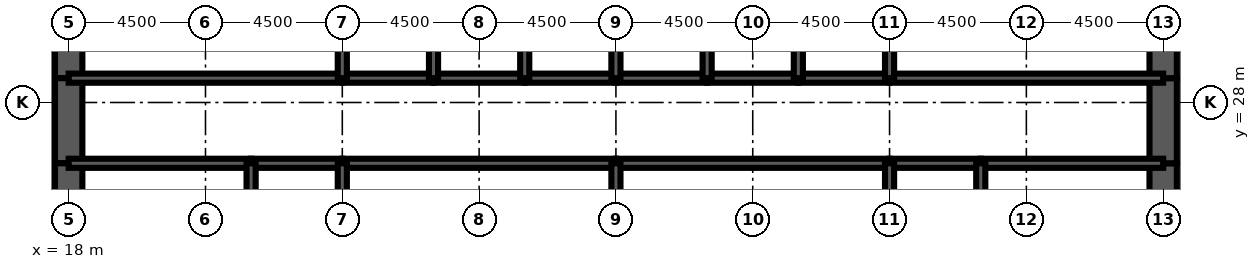
"""IFC4 building model, lengths in metres.
Left out: names, types, materials, properties, quantities, classifications, styles, units other than length and angle.
Written with IfcOpenShell. Run it as: python <this file> out.ifc"""

import sys

from ifc_helpers import new_model, si_unit, direction, frame, frame_2d, origin, place, context, subcontext, project, spatial, rectangle, extrude, element, fill, save


model = new_model("IFC4")
c1 = context("Model", 3, precision=1e-05, world=origin(), true_north=direction((0.0, 1.0)))
c2 = subcontext(c1, "Body", "Model", "MODEL_VIEW")
j1 = project(units=[si_unit("LENGTHUNIT", "METRE"), si_unit("PLANEANGLEUNIT", "RADIAN")], contexts=[c1])
p1 = place(None, origin())
s1 = spatial("IfcSite", under=j1, at=p1, CompositionType="ELEMENT")
p2 = place(p1, origin())
s2 = spatial("IfcBuilding", under=s1, at=p2, CompositionType="ELEMENT")
p3 = place(p2, frame((0.0, 0.0, 100.5)))
s3 = spatial("IfcBuildingStorey", under=s2, at=p3, CompositionType="ELEMENT", Elevation=100.5)
p4 = place(p3, frame((18.0, 32.0, 0.0), z_axis=(0.0, 0.0, 1.0), x_axis=(0.0, -1.0, 0.0)))
e1 = element("IfcWall", 1, at=p4, inside=s3, PredefinedType="SHEAR", context=c2, shape_type="SweptSolid", body=[
    extrude(rectangle(XDim=3.2, YDim=0.9, at=frame_2d((1.6, 0.0))), origin(), (0.0, 0.0, 1.0), 4.2),
])
p5 = place(p3, frame((18.0, 28.8, 0.0), z_axis=(0.0, 0.0, 1.0), x_axis=(0.0, -1.0, 0.0)))
e2 = element("IfcWall", 2, at=p5, inside=s3, PredefinedType="SHEAR", context=c2, shape_type="SweptSolid", body=[
    extrude(rectangle(XDim=2.8, YDim=0.9, at=frame_2d((1.4, 0.0))), origin(), (0.0, 0.0, 1.0), 4.2),
])
p6 = place(p5, frame((0.4, 0.0, 0.0)))
e3 = element("IfcOpeningElement", 3, at=p6, cuts=e2, PredefinedType="OPENING", context=c2, shape_type="SweptSolid", body=[
    extrude(rectangle(XDim=1.8, YDim=2.1, at=frame_2d((0.9, 1.05))), frame((0.0, 0.46, 0.0), z_axis=(0.0, -1.0, 0.0), x_axis=(1.0, 0.0, 0.0)), (0.0, 0.0, 1.0), 0.92),
])
for number, where, z_axis, x_axis in (
    (4, (18.0, 26.0, 0.0), (0.0, 0.0, 1.0), (0.0, -1.0, 0.0)),
    (5, (54.0, 22.0, 0.0), (0.0, 0.0, 1.0), (0.0, 1.0, 0.0)),
):
    element("IfcWall", number, at=place(p3, frame(where, z_axis=z_axis, x_axis=x_axis)), inside=s3, PredefinedType="SHEAR", context=c2, shape_type="SweptSolid", body=[
        extrude(rectangle(XDim=4.0, YDim=0.9, at=frame_2d((2.0, 0.0))), origin(), (0.0, 0.0, 1.0), 4.2),
    ])
p7 = place(p3, frame((54.0, 26.0, 0.0), z_axis=(0.0, 0.0, 1.0), x_axis=(0.0, 1.0, 0.0)))
e6 = element("IfcWall", 6, at=p7, inside=s3, PredefinedType="SHEAR", context=c2, shape_type="SweptSolid", body=[
    extrude(rectangle(XDim=2.8, YDim=0.9, at=frame_2d((1.4, 0.0))), origin(), (0.0, 0.0, 1.0), 4.2),
])
p8 = place(p7, frame((0.6, 0.0, 0.0)))
e7 = element("IfcOpeningElement", 7, at=p8, cuts=e6, PredefinedType="OPENING", context=c2, shape_type="SweptSolid", body=[
    extrude(rectangle(XDim=1.8, YDim=2.1, at=frame_2d((0.9, 1.05))), frame((0.0, 0.46, 0.0), z_axis=(0.0, -1.0, 0.0), x_axis=(1.0, 0.0, 0.0)), (0.0, 0.0, 1.0), 0.92),
])
p9 = place(p3, frame((54.0, 28.8, 0.0), z_axis=(0.0, 0.0, 1.0), x_axis=(0.0, 1.0, 0.0)))
e8 = element("IfcWall", 8, at=p9, inside=s3, PredefinedType="SHEAR", context=c2, shape_type="SweptSolid", body=[
    extrude(rectangle(XDim=3.2, YDim=0.9, at=frame_2d((1.6, 0.0))), origin(), (0.0, 0.0, 1.0), 4.2),
])
p10 = place(p3, frame((18.0, 28.8, 0.0), z_axis=(0.0, 0.0, 1.0), x_axis=(1.0, 0.0, 0.0)))
e9 = element("IfcWall", 9, at=p10, inside=s3, PredefinedType="SOLIDWALL", context=c2, shape_type="SweptSolid", body=[
    extrude(rectangle(XDim=9.0, YDim=0.3, at=frame_2d((4.5, 0.0))), origin(), (0.0, 0.0, 1.0), 4.2),
])
p11 = place(p10, frame((0.65, 0.0, 0.0)))
e10 = element("IfcOpeningElement", 10, at=p11, cuts=e9, PredefinedType="OPENING", context=c2, shape_type="SweptSolid", body=[
    extrude(rectangle(XDim=1.0, YDim=2.1, at=frame_2d((0.5, 1.05))), frame((0.0, 0.16, 0.0), z_axis=(0.0, -1.0, 0.0), x_axis=(1.0, 0.0, 0.0)), (0.0, 0.0, 1.0), 0.32),
])
p12 = place(p3, frame((27.0, 28.8, 0.0), z_axis=(0.0, 0.0, 1.0), x_axis=(1.0, 0.0, 0.0)))
e11 = element("IfcWall", 11, at=p12, inside=s3, PredefinedType="SOLIDWALL", context=c2, shape_type="SweptSolid", body=[
    extrude(rectangle(XDim=3.0, YDim=0.3, at=frame_2d((1.5, 0.0))), origin(), (0.0, 0.0, 1.0), 4.2),
])
p13 = place(p12, frame((0.95, 0.0, 0.0)))
e12 = element("IfcOpeningElement", 12, at=p13, cuts=e11, PredefinedType="OPENING", context=c2, shape_type="SweptSolid", body=[
    extrude(rectangle(XDim=1.1, YDim=2.2, at=frame_2d((0.55, 1.1))), frame((0.0, 0.16, 0.0), z_axis=(0.0, -1.0, 0.0), x_axis=(1.0, 0.0, 0.0)), (0.0, 0.0, 1.0), 0.32),
])
p14 = place(p3, frame((30.0, 28.8, 0.0), z_axis=(0.0, 0.0, 1.0), x_axis=(1.0, 0.0, 0.0)))
e13 = element("IfcWall", 13, at=p14, inside=s3, PredefinedType="SOLIDWALL", context=c2, shape_type="SweptSolid", body=[
    extrude(rectangle(XDim=3.0, YDim=0.3, at=frame_2d((1.5, 0.0))), origin(), (0.0, 0.0, 1.0), 4.2),
])
p15 = place(p14, frame((0.95, 0.0, 0.0)))
e14 = element("IfcOpeningElement", 14, at=p15, cuts=e13, PredefinedType="OPENING", context=c2, shape_type="SweptSolid", body=[
    extrude(rectangle(XDim=1.1, YDim=2.2, at=frame_2d((0.55, 1.1))), frame((0.0, 0.16, 0.0), z_axis=(0.0, -1.0, 0.0), x_axis=(1.0, 0.0, 0.0)), (0.0, 0.0, 1.0), 0.32),
])
p16 = place(p3, frame((33.0, 28.8, 0.0), z_axis=(0.0, 0.0, 1.0), x_axis=(1.0, 0.0, 0.0)))
e15 = element("IfcWall", 15, at=p16, inside=s3, PredefinedType="SOLIDWALL", context=c2, shape_type="SweptSolid", body=[
    extrude(rectangle(XDim=3.0, YDim=0.3, at=frame_2d((1.5, 0.0))), origin(), (0.0, 0.0, 1.0), 4.2),
])
p17 = place(p16, frame((0.95, 0.0, 0.0)))
e16 = element("IfcOpeningElement", 16, at=p17, cuts=e15, PredefinedType="OPENING", context=c2, shape_type="SweptSolid", body=[
    extrude(rectangle(XDim=1.1, YDim=2.2, at=frame_2d((0.55, 1.1))), frame((0.0, 0.16, 0.0), z_axis=(0.0, -1.0, 0.0), x_axis=(1.0, 0.0, 0.0)), (0.0, 0.0, 1.0), 0.32),
])
for number, where, z_axis, x_axis in (
    (17, (36.0, 28.8, 0.0), (0.0, 0.0, 1.0), (1.0, 0.0, 0.0)),
    (18, (39.0, 28.8, 0.0), (0.0, 0.0, 1.0), (1.0, 0.0, 0.0)),
):
    element("IfcWall", number, at=place(p3, frame(where, z_axis=z_axis, x_axis=x_axis)), inside=s3, PredefinedType="SOLIDWALL", context=c2, shape_type="SweptSolid", body=[
        extrude(rectangle(XDim=3.0, YDim=0.3, at=frame_2d((1.5, 0.0))), origin(), (0.0, 0.0, 1.0), 4.2),
    ])
p18 = place(p3, frame((42.0, 28.8, 0.0), z_axis=(0.0, 0.0, 1.0), x_axis=(1.0, 0.0, 0.0)))
e19 = element("IfcWall", 19, at=p18, inside=s3, PredefinedType="SOLIDWALL", context=c2, shape_type="SweptSolid", body=[
    extrude(rectangle(XDim=3.0, YDim=0.3, at=frame_2d((1.5, 0.0))), origin(), (0.0, 0.0, 1.0), 4.2),
])
p19 = place(p18, frame((0.95, 0.0, 0.0)))
e20 = element("IfcOpeningElement", 20, at=p19, cuts=e19, PredefinedType="OPENING", context=c2, shape_type="SweptSolid", body=[
    extrude(rectangle(XDim=1.1, YDim=2.2, at=frame_2d((0.55, 1.1))), frame((0.0, 0.16, 0.0), z_axis=(0.0, -1.0, 0.0), x_axis=(1.0, 0.0, 0.0)), (0.0, 0.0, 1.0), 0.32),
])
p20 = place(p3, frame((45.0, 28.8, 0.0), z_axis=(0.0, 0.0, 1.0), x_axis=(1.0, 0.0, 0.0)))
e21 = element("IfcWall", 21, at=p20, inside=s3, PredefinedType="SOLIDWALL", context=c2, shape_type="SweptSolid", body=[
    extrude(rectangle(XDim=9.0, YDim=0.3, at=frame_2d((4.5, 0.0))), origin(), (0.0, 0.0, 1.0), 4.2),
])
p21 = place(p20, frame((7.35, 0.0, 0.0)))
e22 = element("IfcOpeningElement", 22, at=p21, cuts=e21, PredefinedType="OPENING", context=c2, shape_type="SweptSolid", body=[
    extrude(rectangle(XDim=1.0, YDim=2.1, at=frame_2d((0.5, 1.05))), frame((0.0, 0.16, 0.0), z_axis=(0.0, -1.0, 0.0), x_axis=(1.0, 0.0, 0.0)), (0.0, 0.0, 1.0), 0.32),
])
p22 = place(p3, frame((18.0, 26.0, 0.0), z_axis=(0.0, 0.0, 1.0), x_axis=(1.0, 0.0, 0.0)))
e23 = element("IfcWall", 23, at=p22, inside=s3, PredefinedType="SOLIDWALL", context=c2, shape_type="SweptSolid", body=[
    extrude(rectangle(XDim=6.0, YDim=0.3, at=frame_2d((3.0, 0.0))), origin(), (0.0, 0.0, 1.0), 4.2),
])
p23 = place(p3, frame((24.0, 26.0, 0.0), z_axis=(0.0, 0.0, 1.0), x_axis=(1.0, 0.0, 0.0)))
e24 = element("IfcWall", 24, at=p23, inside=s3, PredefinedType="SOLIDWALL", context=c2, shape_type="SweptSolid", body=[
    extrude(rectangle(XDim=3.0, YDim=0.3, at=frame_2d((1.5, 0.0))), origin(), (0.0, 0.0, 1.0), 4.2),
])
for number, where, z_axis, x_axis in (
    (25, (27.0, 26.0, 0.0), (0.0, 0.0, 1.0), (1.0, 0.0, 0.0)),
    (26, (36.0, 26.0, 0.0), (0.0, 0.0, 1.0), (1.0, 0.0, 0.0)),
):
    element("IfcWall", number, at=place(p3, frame(where, z_axis=z_axis, x_axis=x_axis)), inside=s3, PredefinedType="SOLIDWALL", context=c2, shape_type="SweptSolid", body=[
        extrude(rectangle(XDim=9.0, YDim=0.3, at=frame_2d((4.5, 0.0))), origin(), (0.0, 0.0, 1.0), 4.2),
    ])
p24 = place(p3, frame((45.0, 26.0, 0.0), z_axis=(0.0, 0.0, 1.0), x_axis=(1.0, 0.0, 0.0)))
e27 = element("IfcWall", 27, at=p24, inside=s3, PredefinedType="SOLIDWALL", context=c2, shape_type="SweptSolid", body=[
    extrude(rectangle(XDim=3.0, YDim=0.3, at=frame_2d((1.5, 0.0))), origin(), (0.0, 0.0, 1.0), 4.2),
])
p25 = place(p3, frame((48.0, 26.0, 0.0), z_axis=(0.0, 0.0, 1.0), x_axis=(1.0, 0.0, 0.0)))
e28 = element("IfcWall", 28, at=p25, inside=s3, PredefinedType="SOLIDWALL", context=c2, shape_type="SweptSolid", body=[
    extrude(rectangle(XDim=6.0, YDim=0.3, at=frame_2d((3.0, 0.0))), origin(), (0.0, 0.0, 1.0), 4.2),
])
for number, where, z_axis, x_axis in (
    (29, (27.0, 28.8, 0.0), (0.0, 0.0, 1.0), (0.0, 1.0, 0.0)),
    (30, (30.0, 28.8, 0.0), (0.0, 0.0, 1.0), (0.0, 1.0, 0.0)),
    (31, (33.0, 28.8, 0.0), (0.0, 0.0, 1.0), (0.0, 1.0, 0.0)),
    (32, (36.0, 28.8, 0.0), (0.0, 0.0, 1.0), (0.0, 1.0, 0.0)),
    (33, (39.0, 28.8, 0.0), (0.0, 0.0, 1.0), (0.0, 1.0, 0.0)),
    (34, (42.0, 28.8, 0.0), (0.0, 0.0, 1.0), (0.0, 1.0, 0.0)),
    (35, (45.0, 28.8, 0.0), (0.0, 0.0, 1.0), (0.0, 1.0, 0.0)),
):
    element("IfcWall", number, at=place(p3, frame(where, z_axis=z_axis, x_axis=x_axis)), inside=s3, PredefinedType="SOLIDWALL", context=c2, shape_type="SweptSolid", body=[
        extrude(rectangle(XDim=3.2, YDim=0.3, at=frame_2d((1.6, 0.0))), origin(), (0.0, 0.0, 1.0), 4.2),
    ])
for number, where, z_axis, x_axis in (
    (36, (24.0, 22.0, 0.0), (0.0, 0.0, 1.0), (0.0, 1.0, 0.0)),
    (37, (27.0, 22.0, 0.0), (0.0, 0.0, 1.0), (0.0, 1.0, 0.0)),
    (38, (36.0, 22.0, 0.0), (0.0, 0.0, 1.0), (0.0, 1.0, 0.0)),
    (39, (45.0, 22.0, 0.0), (0.0, 0.0, 1.0), (0.0, 1.0, 0.0)),
    (40, (48.0, 22.0, 0.0), (0.0, 0.0, 1.0), (0.0, 1.0, 0.0)),
):
    element("IfcWall", number, at=place(p3, frame(where, z_axis=z_axis, x_axis=x_axis)), inside=s3, PredefinedType="SOLIDWALL", context=c2, shape_type="SweptSolid", body=[
        extrude(rectangle(XDim=4.0, YDim=0.3, at=frame_2d((2.0, 0.0))), origin(), (0.0, 0.0, 1.0), 4.2),
    ])
p26 = place(p3, frame((42.5, 22.15, 0.0), z_axis=(0.0, 0.0, 1.0), x_axis=(0.0, 1.0, 0.0)))
e41 = element("IfcWall", 41, at=p26, inside=s3, PredefinedType="PARTITIONING", context=c2, shape_type="SweptSolid", body=[
    extrude(rectangle(XDim=3.7, YDim=0.15, at=frame_2d((1.85, 0.0))), origin(), (0.0, 0.0, 1.0), 3.0),
])
p27 = place(p26, frame((2.2, 0.0, 0.0)))
e42 = element("IfcOpeningElement", 42, at=p27, cuts=e41, PredefinedType="OPENING", context=c2, shape_type="SweptSolid", body=[
    extrude(rectangle(XDim=1.0, YDim=2.1, at=frame_2d((0.5, 1.05))), frame((0.0, 0.085, 0.0), z_axis=(0.0, -1.0, 0.0), x_axis=(1.0, 0.0, 0.0)), (0.0, 0.0, 1.0), 0.17),
])
p28 = place(p3, frame((51.975, 22.15, 0.0), z_axis=(0.0, 0.0, 1.0), x_axis=(0.0, 1.0, 0.0)))
e43 = element("IfcWall", 43, at=p28, inside=s3, PredefinedType="PARTITIONING", context=c2, shape_type="SweptSolid", body=[
    extrude(rectangle(XDim=3.7, YDim=0.15, at=frame_2d((1.85, 0.0))), origin(), (0.0, 0.0, 1.0), 3.0),
])
p29 = place(p27, origin())
e44 = element("IfcDoor", 44, at=p29, inside=s3, OperationType="SINGLE_SWING_RIGHT", PredefinedType="DOOR", context=c2, shape_type="SweptSolid", body=[
    extrude(rectangle(XDim=1.0, YDim=2.1, at=frame_2d((0.5, 1.05))), frame((0.0, 0.025, 0.0), z_axis=(0.0, -1.0, 0.0), x_axis=(1.0, 0.0, 0.0)), (0.0, 0.0, 1.0), 0.05),
])
fill(e42, e44)
p30 = place(p19, origin())
e45 = element("IfcDoor", 45, at=p30, inside=s3, OperationType="DOUBLE_DOOR_SLIDING", PredefinedType="USERDEFINED", context=c2, shape_type="SweptSolid", body=[
    extrude(rectangle(XDim=1.1, YDim=2.2, at=frame_2d((0.55, 1.1))), frame((0.0, 0.025, 0.0), z_axis=(0.0, -1.0, 0.0), x_axis=(1.0, 0.0, 0.0)), (0.0, 0.0, 1.0), 0.05),
])
fill(e20, e45)
p31 = place(p13, origin())
e46 = element("IfcDoor", 46, at=p31, inside=s3, OperationType="DOUBLE_DOOR_SLIDING", PredefinedType="USERDEFINED", context=c2, shape_type="SweptSolid", body=[
    extrude(rectangle(XDim=1.1, YDim=2.2, at=frame_2d((0.55, 1.1))), frame((0.0, 0.025, 0.0), z_axis=(0.0, -1.0, 0.0), x_axis=(1.0, 0.0, 0.0)), (0.0, 0.0, 1.0), 0.05),
])
fill(e12, e46)
p32 = place(p15, origin())
e47 = element("IfcDoor", 47, at=p32, inside=s3, OperationType="DOUBLE_DOOR_SLIDING", PredefinedType="USERDEFINED", context=c2, shape_type="SweptSolid", body=[
    extrude(rectangle(XDim=1.1, YDim=2.2, at=frame_2d((0.55, 1.1))), frame((0.0, 0.025, 0.0), z_axis=(0.0, -1.0, 0.0), x_axis=(1.0, 0.0, 0.0)), (0.0, 0.0, 1.0), 0.05),
])
fill(e14, e47)
p33 = place(p17, origin())
e48 = element("IfcDoor", 48, at=p33, inside=s3, OperationType="DOUBLE_DOOR_SLIDING", PredefinedType="USERDEFINED", context=c2, shape_type="SweptSolid", body=[
    extrude(rectangle(XDim=1.1, YDim=2.2, at=frame_2d((0.55, 1.1))), frame((0.0, 0.025, 0.0), z_axis=(0.0, -1.0, 0.0), x_axis=(1.0, 0.0, 0.0)), (0.0, 0.0, 1.0), 0.05),
])
fill(e16, e48)
p34 = place(p11, origin())
e49 = element("IfcDoor", 49, at=p34, inside=s3, OperationType="SINGLE_SWING_LEFT", PredefinedType="DOOR", context=c2, shape_type="SweptSolid", body=[
    extrude(rectangle(XDim=1.0, YDim=2.1, at=frame_2d((0.5, 1.05))), frame((0.0, 0.025, 0.0), z_axis=(0.0, -1.0, 0.0), x_axis=(1.0, 0.0, 0.0)), (0.0, 0.0, 1.0), 0.05),
])
fill(e10, e49)
p35 = place(p21, origin())
e50 = element("IfcDoor", 50, at=p35, inside=s3, OperationType="SINGLE_SWING_RIGHT", PredefinedType="DOOR", context=c2, shape_type="SweptSolid", body=[
    extrude(rectangle(XDim=1.0, YDim=2.1, at=frame_2d((0.5, 1.05))), frame((0.0, 0.025, 0.0), z_axis=(0.0, -1.0, 0.0), x_axis=(1.0, 0.0, 0.0)), (0.0, 0.0, 1.0), 0.05),
])
fill(e22, e50)
p36 = place(p6, origin())
e51 = element("IfcDoor", 51, at=p36, inside=s3, OperationType="SINGLE_SWING_LEFT", PredefinedType="DOOR", context=c2, shape_type="SweptSolid", body=[
    extrude(rectangle(XDim=1.8, YDim=2.1, at=frame_2d((0.9, 1.05))), frame((0.0, 0.45, 0.0), z_axis=(0.0, -1.0, 0.0), x_axis=(1.0, 0.0, 0.0)), (0.0, 0.0, 1.0), 0.899),
])
fill(e3, e51)
p37 = place(p8, origin())
e52 = element("IfcDoor", 52, at=p37, inside=s3, OperationType="SINGLE_SWING_LEFT", PredefinedType="DOOR", context=c2, shape_type="SweptSolid", body=[
    extrude(rectangle(XDim=1.8, YDim=2.1, at=frame_2d((0.9, 1.05))), frame((0.0, 0.45, 0.0), z_axis=(0.0, -1.0, 0.0), x_axis=(1.0, 0.0, 0.0)), (0.0, 0.0, 1.0), 0.899),
])
fill(e7, e52)
save(model, sys.argv[1])
